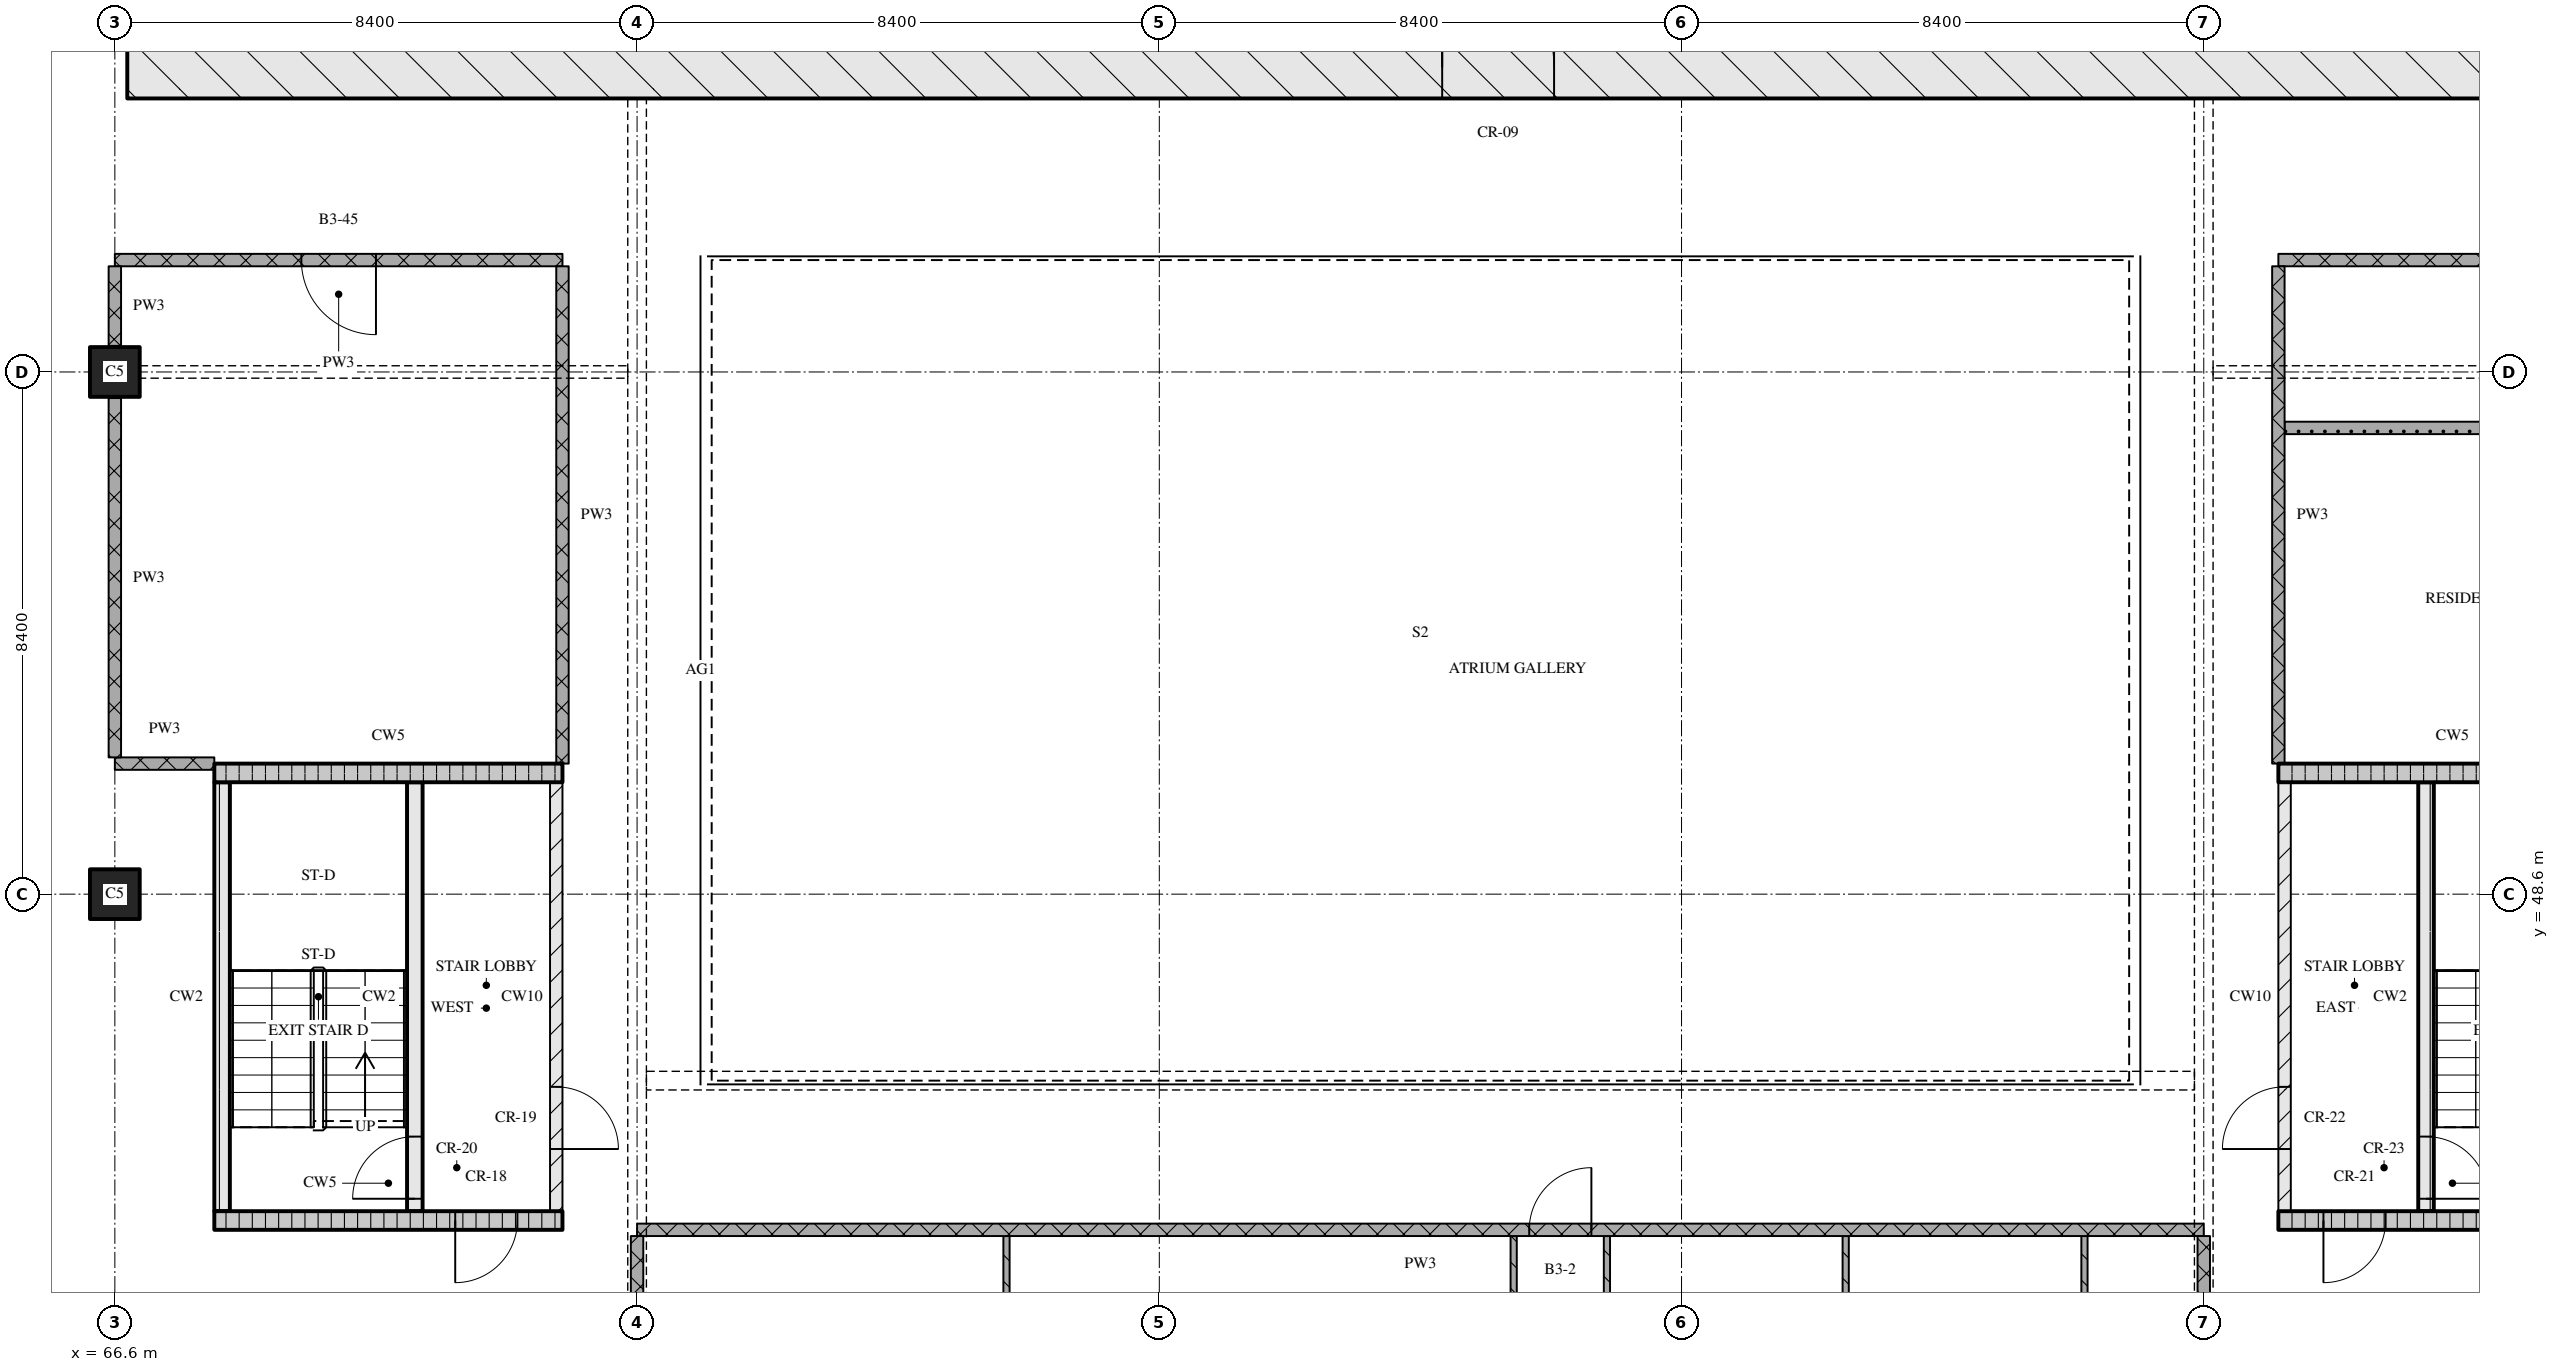
"""IFC4 building model, lengths in metres.
Left out: names, types, materials, properties, quantities, classifications, styles, units other than length and angle.
Written with IfcOpenShell. Run it as: python <this file> out.ifc"""

import sys

from ifc_helpers import new_model, si_unit, direction, frame, frame_2d, origin, origin_2d, place, context, subcontext, project, spatial, rectangle, extrude, element, fill, save


model = new_model("IFC4")
c1 = context("Model", 3, precision=1e-05, world=origin(), true_north=direction((0.0, 1.0)))
c2 = subcontext(c1, "Body", "Model", "MODEL_VIEW")
j1 = project(units=[si_unit("LENGTHUNIT", "METRE"), si_unit("PLANEANGLEUNIT", "RADIAN")], contexts=[c1])
p1 = place(None, origin())
s1 = spatial("IfcSite", under=j1, at=p1, CompositionType="ELEMENT")
p2 = place(p1, origin())
s2 = spatial("IfcBuilding", under=s1, at=p2, CompositionType="ELEMENT")
p3 = place(p2, frame((0.0, 0.0, 120.45)))
s3 = spatial("IfcBuildingStorey", under=s2, at=p3, CompositionType="ELEMENT", Elevation=120.45)
for number, where, z_axis, x_axis in (
    (1, (66.6, 48.6, 0.0), (0.0, 0.0, 1.0), (1.0, 0.0, 0.0)),
    (2, (66.6, 57.0, 0.0), (0.0, 0.0, 1.0), (1.0, 0.0, 0.0)),
):
    element("IfcColumn", number, at=place(p3, frame(where, z_axis=z_axis, x_axis=x_axis)), inside=s3, PredefinedType="COLUMN", context=c2, shape_type="SweptSolid", body=[
        extrude(rectangle(XDim=0.8, YDim=0.8, at=origin_2d()), origin(), (0.0, 0.0, 1.0), 3.6),
    ])
p4 = place(p3, frame((66.8, 61.9, 0.0), z_axis=(0.0, 0.0, 1.0), x_axis=(1.0, 0.0, 0.0)))
e3 = element("IfcWall", 3, at=p4, inside=s3, PredefinedType="SOLIDWALL", context=c2, shape_type="SweptSolid", body=[
    extrude(rectangle(XDim=41.6, YDim=1.0, at=frame_2d((20.8, 0.0))), origin(), (0.0, 0.0, 1.0), 3.32),
])
p5 = place(p4, frame((21.15, 0.0, 0.0)))
e4 = element("IfcOpeningElement", 4, at=p5, cuts=e3, PredefinedType="OPENING", context=c2, shape_type="SweptSolid", body=[
    extrude(rectangle(XDim=1.8, YDim=2.1, at=frame_2d((0.9, 1.05))), frame((0.0, 0.51, 0.0), z_axis=(0.0, -1.0, 0.0), x_axis=(1.0, 0.0, 0.0)), (0.0, 0.0, 1.0), 1.02),
])
p6 = place(p3, frame((68.2, 43.35, 0.0), z_axis=(0.0, 0.0, 1.0), x_axis=(1.0, 0.0, 0.0)))
e5 = element("IfcWall", 5, at=p6, inside=s3, PredefinedType="SOLIDWALL", context=c2, shape_type="SweptSolid", body=[
    extrude(rectangle(XDim=5.6, YDim=0.3, at=frame_2d((2.8, 0.0))), origin(), (0.0, 0.0, 1.0), 3.32),
])
p7 = place(p6, frame((3.875, 0.0, 0.0)))
e6 = element("IfcOpeningElement", 6, at=p7, cuts=e5, PredefinedType="OPENING", context=c2, shape_type="SweptSolid", body=[
    extrude(rectangle(XDim=1.0, YDim=2.1, at=frame_2d((0.5, 1.05))), frame((0.0, 0.16, 0.0), z_axis=(0.0, -1.0, 0.0), x_axis=(1.0, 0.0, 0.0)), (0.0, 0.0, 1.0), 0.32),
])
p8 = place(p3, frame((68.325, 43.5, 0.0), z_axis=(0.0, 0.0, 1.0), x_axis=(0.0, 1.0, 0.0)))
e7 = element("IfcWall", 7, at=p8, inside=s3, PredefinedType="SOLIDWALL", context=c2, shape_type="SweptSolid", body=[
    extrude(rectangle(XDim=6.9, YDim=0.25, at=frame_2d((3.45, 0.0))), origin(), (0.0, 0.0, 1.0), 3.32),
])
p9 = place(p3, frame((71.425, 43.5, 0.0), z_axis=(0.0, 0.0, 1.0), x_axis=(0.0, 1.0, 0.0)))
e8 = element("IfcWall", 8, at=p9, inside=s3, PredefinedType="SOLIDWALL", context=c2, shape_type="SweptSolid", body=[
    extrude(rectangle(XDim=6.9, YDim=0.25, at=frame_2d((3.45, 0.0))), origin(), (0.0, 0.0, 1.0), 3.32),
])
p10 = place(p9, frame((0.2, 0.0, 0.0)))
e9 = element("IfcOpeningElement", 9, at=p10, cuts=e8, PredefinedType="OPENING", context=c2, shape_type="SweptSolid", body=[
    extrude(rectangle(XDim=1.0, YDim=2.1, at=frame_2d((0.5, 1.05))), frame((0.0, 0.135, 0.0), z_axis=(0.0, -1.0, 0.0), x_axis=(1.0, 0.0, 0.0)), (0.0, 0.0, 1.0), 0.27),
])
p11 = place(p3, frame((73.7, 43.5, 0.0), z_axis=(0.0, 0.0, 1.0), x_axis=(0.0, 1.0, 0.0)))
e10 = element("IfcWall", 10, at=p11, inside=s3, PredefinedType="PARTITIONING", context=c2, shape_type="SweptSolid", body=[
    extrude(rectangle(XDim=6.9, YDim=0.2, at=frame_2d((3.45, 0.0))), origin(), (0.0, 0.0, 1.0), 3.32),
])
p12 = place(p11, frame((1.0, 0.0, 0.0)))
e11 = element("IfcOpeningElement", 11, at=p12, cuts=e10, PredefinedType="OPENING", context=c2, shape_type="SweptSolid", body=[
    extrude(rectangle(XDim=1.0, YDim=2.1, at=frame_2d((0.5, 1.05))), frame((0.0, 0.11, 0.0), z_axis=(0.0, -1.0, 0.0), x_axis=(1.0, 0.0, 0.0)), (0.0, 0.0, 1.0), 0.22),
])
p13 = place(p3, frame((68.2, 50.55, 0.0), z_axis=(0.0, 0.0, 1.0), x_axis=(1.0, 0.0, 0.0)))
e12 = element("IfcWall", 12, at=p13, inside=s3, PredefinedType="SOLIDWALL", context=c2, shape_type="SweptSolid", body=[
    extrude(rectangle(XDim=5.6, YDim=0.3, at=frame_2d((2.8, 0.0))), origin(), (0.0, 0.0, 1.0), 3.32),
])
p14 = place(p3, frame((101.4, 43.35, 0.0), z_axis=(0.0, 0.0, 1.0), x_axis=(1.0, 0.0, 0.0)))
e13 = element("IfcWall", 13, at=p14, inside=s3, PredefinedType="SOLIDWALL", context=c2, shape_type="SweptSolid", body=[
    extrude(rectangle(XDim=5.6, YDim=0.3, at=frame_2d((2.8, 0.0))), origin(), (0.0, 0.0, 1.0), 3.32),
])
p15 = place(p14, frame((0.725, 0.0, 0.0)))
e14 = element("IfcOpeningElement", 14, at=p15, cuts=e13, PredefinedType="OPENING", context=c2, shape_type="SweptSolid", body=[
    extrude(rectangle(XDim=1.0, YDim=2.1, at=frame_2d((0.5, 1.05))), frame((0.0, 0.16, 0.0), z_axis=(0.0, -1.0, 0.0), x_axis=(1.0, 0.0, 0.0)), (0.0, 0.0, 1.0), 0.32),
])
p16 = place(p3, frame((101.5, 43.5, 0.0), z_axis=(0.0, 0.0, 1.0), x_axis=(0.0, 1.0, 0.0)))
e15 = element("IfcWall", 15, at=p16, inside=s3, PredefinedType="PARTITIONING", context=c2, shape_type="SweptSolid", body=[
    extrude(rectangle(XDim=6.9, YDim=0.2, at=frame_2d((3.45, 0.0))), origin(), (0.0, 0.0, 1.0), 3.32),
])
p17 = place(p16, frame((1.0, 0.0, 0.0)))
e16 = element("IfcOpeningElement", 16, at=p17, cuts=e15, PredefinedType="OPENING", context=c2, shape_type="SweptSolid", body=[
    extrude(rectangle(XDim=1.0, YDim=2.1, at=frame_2d((0.5, 1.05))), frame((0.0, 0.11, 0.0), z_axis=(0.0, -1.0, 0.0), x_axis=(1.0, 0.0, 0.0)), (0.0, 0.0, 1.0), 0.22),
])
p18 = place(p3, frame((103.775, 43.5, 0.0), z_axis=(0.0, 0.0, 1.0), x_axis=(0.0, 1.0, 0.0)))
e17 = element("IfcWall", 17, at=p18, inside=s3, PredefinedType="SOLIDWALL", context=c2, shape_type="SweptSolid", body=[
    extrude(rectangle(XDim=6.9, YDim=0.25, at=frame_2d((3.45, 0.0))), origin(), (0.0, 0.0, 1.0), 3.32),
])
p19 = place(p18, frame((0.2, 0.0, 0.0)))
e18 = element("IfcOpeningElement", 18, at=p19, cuts=e17, PredefinedType="OPENING", context=c2, shape_type="SweptSolid", body=[
    extrude(rectangle(XDim=1.0, YDim=2.1, at=frame_2d((0.5, 1.05))), frame((0.0, 0.135, 0.0), z_axis=(0.0, -1.0, 0.0), x_axis=(1.0, 0.0, 0.0)), (0.0, 0.0, 1.0), 0.27),
])
p20 = place(p3, frame((101.4, 50.55, 0.0), z_axis=(0.0, 0.0, 1.0), x_axis=(1.0, 0.0, 0.0)))
e19 = element("IfcWall", 19, at=p20, inside=s3, PredefinedType="SOLIDWALL", context=c2, shape_type="SweptSolid", body=[
    extrude(rectangle(XDim=5.6, YDim=0.3, at=frame_2d((2.8, 0.0))), origin(), (0.0, 0.0, 1.0), 3.32),
])
p21 = place(p3, frame((100.2, 43.2, 0.0), z_axis=(0.0, 0.0, 1.0), x_axis=(-1.0, 0.0, 0.0)))
e20 = element("IfcWall", 20, at=p21, inside=s3, PredefinedType="PARTITIONING", context=c2, shape_type="SweptSolid", body=[
    extrude(rectangle(XDim=25.2, YDim=0.2, at=frame_2d((12.6, 0.0))), origin(), (0.0, 0.0, 1.0), 3.32),
])
p22 = place(p21, frame((9.85, 0.0, 0.0)))
e21 = element("IfcOpeningElement", 21, at=p22, cuts=e20, PredefinedType="OPENING", context=c2, shape_type="SweptSolid", body=[
    extrude(rectangle(XDim=1.0, YDim=2.1, at=frame_2d((0.5, 1.05))), frame((0.0, 0.11, 0.0), z_axis=(0.0, -1.0, 0.0), x_axis=(1.0, 0.0, 0.0)), (0.0, 0.0, 1.0), 0.22),
])
p23 = place(p3, frame((66.6, 50.7, 0.0), z_axis=(0.0, 0.0, 1.0), x_axis=(1.0, 0.0, 0.0)))
e22 = element("IfcWall", 22, at=p23, inside=s3, PredefinedType="PARTITIONING", context=c2, shape_type="SweptSolid", body=[
    extrude(rectangle(XDim=1.6, YDim=0.2, at=frame_2d((0.8, 0.0))), origin(), (0.0, 0.0, 1.0), 3.32),
])
p24 = place(p3, frame((101.5, 56.1, 0.0), z_axis=(0.0, 0.0, 1.0), x_axis=(1.0, 0.0, 0.0)))
e23 = element("IfcWall", 23, at=p24, inside=s3, PredefinedType="PARTITIONING", context=c2, shape_type="SweptSolid", body=[
    extrude(rectangle(XDim=7.0, YDim=0.2, at=frame_2d((3.5, 0.0))), origin(), (0.0, 0.0, 1.0), 3.32),
])
p25 = place(p3, frame((73.8, 58.8, 0.0), z_axis=(0.0, 0.0, 1.0), x_axis=(-1.0, 0.0, 0.0)))
e24 = element("IfcWall", 24, at=p25, inside=s3, PredefinedType="PARTITIONING", context=c2, shape_type="SweptSolid", body=[
    extrude(rectangle(XDim=7.2, YDim=0.2, at=frame_2d((3.6, 0.0))), origin(), (0.0, 0.0, 1.0), 3.32),
])
p26 = place(p25, frame((3.0, 0.0, 0.0)))
e25 = element("IfcOpeningElement", 25, at=p26, cuts=e24, PredefinedType="OPENING", context=c2, shape_type="SweptSolid", body=[
    extrude(rectangle(XDim=1.2, YDim=2.1, at=frame_2d((0.6, 1.05))), frame((0.0, 0.11, 0.0), z_axis=(0.0, -1.0, 0.0), x_axis=(1.0, 0.0, 0.0)), (0.0, 0.0, 1.0), 0.22),
])
p27 = place(p3, frame((101.4, 58.8, 0.0), z_axis=(0.0, 0.0, 1.0), x_axis=(1.0, 0.0, 0.0)))
e26 = element("IfcWall", 26, at=p27, inside=s3, PredefinedType="PARTITIONING", context=c2, shape_type="SweptSolid", body=[
    extrude(rectangle(XDim=7.2, YDim=0.2, at=frame_2d((3.6, 0.0))), origin(), (0.0, 0.0, 1.0), 3.32),
])
p28 = place(p3, frame((66.6, 56.58, 0.0), z_axis=(0.0, 0.0, 1.0), x_axis=(0.0, -1.0, 0.0)))
e27 = element("IfcWall", 27, at=p28, inside=s3, PredefinedType="PARTITIONING", context=c2, shape_type="SweptSolid", body=[
    extrude(rectangle(XDim=5.78, YDim=0.2, at=frame_2d((2.89, 0.0))), origin(), (0.0, 0.0, 1.0), 3.32),
])
p29 = place(p3, frame((66.6, 58.7, 0.0), z_axis=(0.0, 0.0, 1.0), x_axis=(0.0, -1.0, 0.0)))
e28 = element("IfcWall", 28, at=p29, inside=s3, PredefinedType="PARTITIONING", context=c2, shape_type="SweptSolid", body=[
    extrude(rectangle(XDim=1.28, YDim=0.2, at=frame_2d((0.64, 0.0))), origin(), (0.0, 0.0, 1.0), 3.32),
])
p30 = place(p3, frame((73.8, 58.7, 0.0), z_axis=(0.0, 0.0, 1.0), x_axis=(0.0, -1.0, 0.0)))
e29 = element("IfcWall", 29, at=p30, inside=s3, PredefinedType="PARTITIONING", context=c2, shape_type="SweptSolid", body=[
    extrude(rectangle(XDim=8.0, YDim=0.2, at=frame_2d((4.0, 0.0))), origin(), (0.0, 0.0, 1.0), 3.32),
])
p31 = place(p3, frame((75.0, 43.1, 0.0), z_axis=(0.0, 0.0, 1.0), x_axis=(0.0, -1.0, 0.0)))
e30 = element("IfcWall", 30, at=p31, inside=s3, PredefinedType="PARTITIONING", context=c2, shape_type="SweptSolid", body=[
    extrude(rectangle(XDim=2.2, YDim=0.2, at=frame_2d((1.1, 0.0))), origin(), (0.0, 0.0, 1.0), 2.43),
])
p32 = place(p3, frame((80.942, 43.1, 0.0), z_axis=(0.0, 0.0, 1.0), x_axis=(0.0, -1.0, 0.0)))
e31 = element("IfcWall", 31, at=p32, inside=s3, PredefinedType="PARTITIONING", context=c2, shape_type="SweptSolid", body=[
    extrude(rectangle(XDim=6.75, YDim=0.1, at=frame_2d((3.375, 0.0))), origin(), (0.0, 0.0, 1.0), 3.32),
])
p33 = place(p3, frame((89.1, 36.35, 0.0), z_axis=(0.0, 0.0, 1.0), x_axis=(0.0, 1.0, 0.0)))
e32 = element("IfcWall", 32, at=p33, inside=s3, PredefinedType="PARTITIONING", context=c2, shape_type="SweptSolid", body=[
    extrude(rectangle(XDim=6.75, YDim=0.1, at=frame_2d((3.375, 0.0))), origin(), (0.0, 0.0, 1.0), 3.32),
])
p34 = place(p33, frame((2.95, 0.0, 0.0)))
e33 = element("IfcOpeningElement", 33, at=p34, cuts=e32, PredefinedType="OPENING", context=c2, shape_type="SweptSolid", body=[
    extrude(rectangle(XDim=0.9, YDim=2.1, at=frame_2d((0.45, 1.05))), frame((0.0, 0.06, 0.0), z_axis=(0.0, -1.0, 0.0), x_axis=(1.0, 0.0, 0.0)), (0.0, 0.0, 1.0), 0.12),
])
p35 = place(p3, frame((90.6, 43.1, 0.0), z_axis=(0.0, 0.0, 1.0), x_axis=(0.0, -1.0, 0.0)))
e34 = element("IfcWall", 34, at=p35, inside=s3, PredefinedType="PARTITIONING", context=c2, shape_type="SweptSolid", body=[
    extrude(rectangle(XDim=6.75, YDim=0.1, at=frame_2d((3.375, 0.0))), origin(), (0.0, 0.0, 1.0), 3.32),
])
p36 = place(p35, frame((3.4, 0.0, 0.0)))
e35 = element("IfcOpeningElement", 35, at=p36, cuts=e34, PredefinedType="OPENING", context=c2, shape_type="SweptSolid", body=[
    extrude(rectangle(XDim=0.8, YDim=2.1, at=frame_2d((0.4, 1.05))), frame((0.0, 0.06, 0.0), z_axis=(0.0, -1.0, 0.0), x_axis=(1.0, 0.0, 0.0)), (0.0, 0.0, 1.0), 0.12),
])
for number, where, z_axis, x_axis in (
    (36, (94.441, 43.1, 0.0), (0.0, 0.0, 1.0), (0.0, -1.0, 0.0)),
    (37, (98.281, 43.1, 0.0), (0.0, 0.0, 1.0), (0.0, -1.0, 0.0)),
):
    element("IfcWall", number, at=place(p3, frame(where, z_axis=z_axis, x_axis=x_axis)), inside=s3, PredefinedType="PARTITIONING", context=c2, shape_type="SweptSolid", body=[
        extrude(rectangle(XDim=6.75, YDim=0.1, at=frame_2d((3.375, 0.0))), origin(), (0.0, 0.0, 1.0), 3.32),
    ])
p37 = place(p3, frame((100.2, 43.1, 0.0), z_axis=(0.0, 0.0, 1.0), x_axis=(0.0, -1.0, 0.0)))
e38 = element("IfcWall", 38, at=p37, inside=s3, PredefinedType="PARTITIONING", context=c2, shape_type="SweptSolid", body=[
    extrude(rectangle(XDim=2.2, YDim=0.2, at=frame_2d((1.1, 0.0))), origin(), (0.0, 0.0, 1.0), 2.43),
])
p38 = place(p3, frame((101.4, 58.7, 0.0), z_axis=(0.0, 0.0, 1.0), x_axis=(0.0, -1.0, 0.0)))
e39 = element("IfcWall", 39, at=p38, inside=s3, PredefinedType="PARTITIONING", context=c2, shape_type="SweptSolid", body=[
    extrude(rectangle(XDim=8.0, YDim=0.2, at=frame_2d((4.0, 0.0))), origin(), (0.0, 0.0, 1.0), 3.32),
])
p39 = place(p5, origin())
e40 = element("IfcDoor", 40, at=p39, inside=s3, OperationType="DOUBLE_DOOR_SINGLE_SWING", PredefinedType="DOOR", context=c2, shape_type="SweptSolid", body=[
    extrude(rectangle(XDim=1.8, YDim=2.1, at=frame_2d((0.9, 1.05))), frame((0.0, 0.025, 0.0), z_axis=(0.0, -1.0, 0.0), x_axis=(1.0, 0.0, 0.0)), (0.0, 0.0, 1.0), 0.05),
])
fill(e4, e40)
p40 = place(p7, origin())
e41 = element("IfcDoor", 41, at=p40, inside=s3, OperationType="SINGLE_SWING_RIGHT", PredefinedType="DOOR", context=c2, shape_type="SweptSolid", body=[
    extrude(rectangle(XDim=1.0, YDim=2.1, at=frame_2d((0.5, 1.05))), frame((0.0, 0.025, 0.0), z_axis=(0.0, -1.0, 0.0), x_axis=(1.0, 0.0, 0.0)), (0.0, 0.0, 1.0), 0.05),
])
fill(e6, e41)
p41 = place(p10, origin())
e42 = element("IfcDoor", 42, at=p41, inside=s3, OperationType="SINGLE_SWING_LEFT", PredefinedType="DOOR", context=c2, shape_type="SweptSolid", body=[
    extrude(rectangle(XDim=1.0, YDim=2.1, at=frame_2d((0.5, 1.05))), frame((0.0, 0.025, 0.0), z_axis=(0.0, -1.0, 0.0), x_axis=(1.0, 0.0, 0.0)), (0.0, 0.0, 1.0), 0.05),
])
fill(e9, e42)
p42 = place(p12, origin())
e43 = element("IfcDoor", 43, at=p42, inside=s3, OperationType="SINGLE_SWING_RIGHT", PredefinedType="DOOR", context=c2, shape_type="SweptSolid", body=[
    extrude(rectangle(XDim=1.0, YDim=2.1, at=frame_2d((0.5, 1.05))), frame((0.0, 0.025, 0.0), z_axis=(0.0, -1.0, 0.0), x_axis=(1.0, 0.0, 0.0)), (0.0, 0.0, 1.0), 0.05),
])
fill(e11, e43)
p43 = place(p15, origin())
e44 = element("IfcDoor", 44, at=p43, inside=s3, OperationType="SINGLE_SWING_RIGHT", PredefinedType="DOOR", context=c2, shape_type="SweptSolid", body=[
    extrude(rectangle(XDim=1.0, YDim=2.1, at=frame_2d((0.5, 1.05))), frame((0.0, 0.025, 0.0), z_axis=(0.0, -1.0, 0.0), x_axis=(1.0, 0.0, 0.0)), (0.0, 0.0, 1.0), 0.05),
])
fill(e14, e44)
p44 = place(p19, origin())
e45 = element("IfcDoor", 45, at=p44, inside=s3, OperationType="SINGLE_SWING_RIGHT", PredefinedType="DOOR", context=c2, shape_type="SweptSolid", body=[
    extrude(rectangle(XDim=1.0, YDim=2.1, at=frame_2d((0.5, 1.05))), frame((0.0, 0.025, 0.0), z_axis=(0.0, -1.0, 0.0), x_axis=(1.0, 0.0, 0.0)), (0.0, 0.0, 1.0), 0.05),
])
fill(e18, e45)
p45 = place(p17, origin())
e46 = element("IfcDoor", 46, at=p45, inside=s3, OperationType="SINGLE_SWING_LEFT", PredefinedType="DOOR", context=c2, shape_type="SweptSolid", body=[
    extrude(rectangle(XDim=1.0, YDim=2.1, at=frame_2d((0.5, 1.05))), frame((0.0, 0.025, 0.0), z_axis=(0.0, -1.0, 0.0), x_axis=(1.0, 0.0, 0.0)), (0.0, 0.0, 1.0), 0.05),
])
fill(e16, e46)
p46 = place(p22, origin())
e47 = element("IfcDoor", 47, at=p46, inside=s3, OperationType="SINGLE_SWING_RIGHT", PredefinedType="DOOR", context=c2, shape_type="SweptSolid", body=[
    extrude(rectangle(XDim=1.0, YDim=2.1, at=frame_2d((0.5, 1.05))), frame((0.0, 0.025, 0.0), z_axis=(0.0, -1.0, 0.0), x_axis=(1.0, 0.0, 0.0)), (0.0, 0.0, 1.0), 0.05),
])
fill(e21, e47)
p47 = place(p26, origin())
e48 = element("IfcDoor", 48, at=p47, inside=s3, OperationType="SINGLE_SWING_LEFT", PredefinedType="DOOR", context=c2, shape_type="SweptSolid", body=[
    extrude(rectangle(XDim=1.2, YDim=2.1, at=frame_2d((0.6, 1.05))), frame((0.0, 0.025, 0.0), z_axis=(0.0, -1.0, 0.0), x_axis=(1.0, 0.0, 0.0)), (0.0, 0.0, 1.0), 0.05),
])
fill(e25, e48)
save(model, sys.argv[1])
